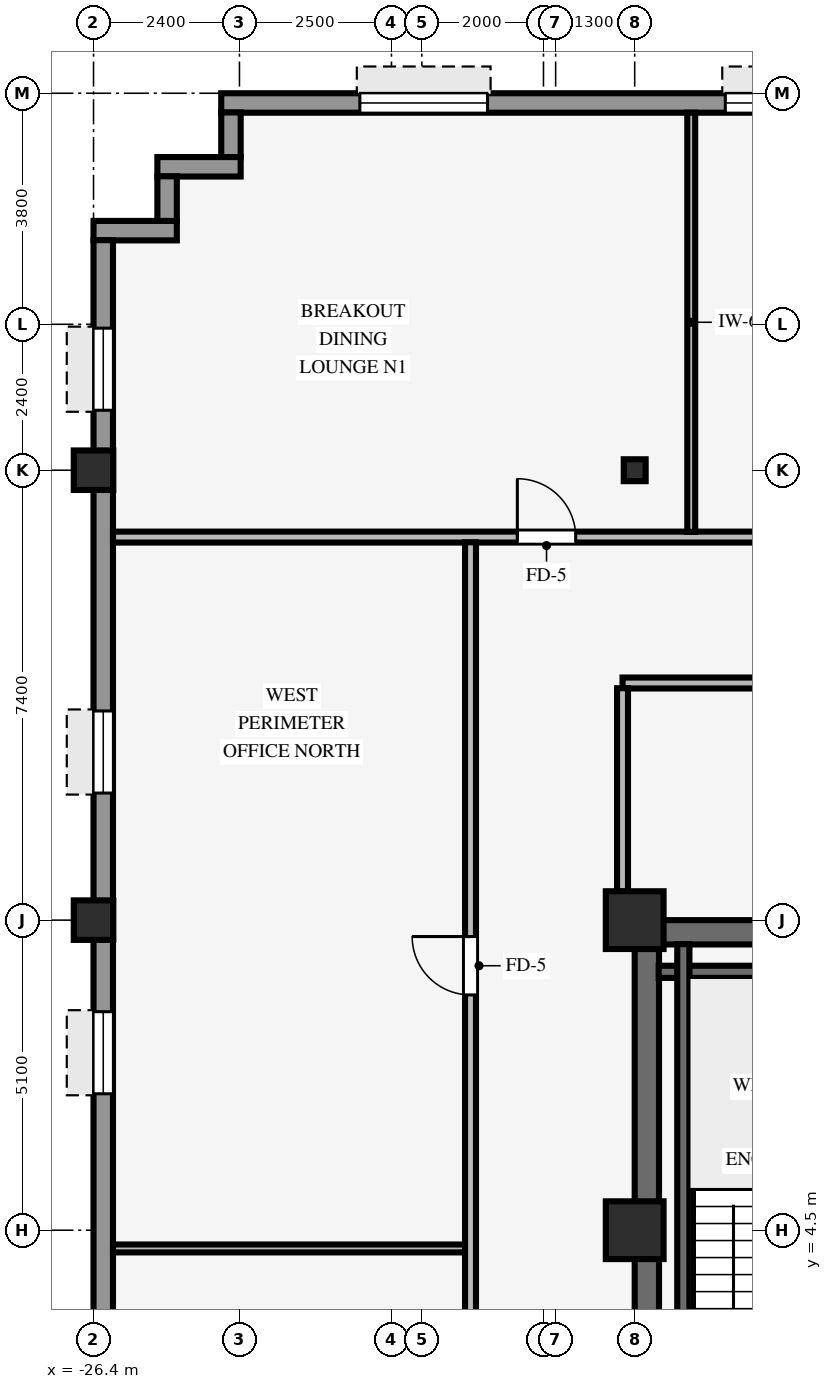
"""IFC4 building model, lengths in metres.
Left out: names, types, materials, properties, quantities, classifications, styles, units other than length and angle.
Written with IfcOpenShell. Run it as: python <this file> out.ifc"""

import sys

from ifc_helpers import new_model, si_unit, direction, frame, frame_2d, origin, origin_2d, place, context, subcontext, project, spatial, rectangle, hollow_rectangle, i_section, extrude, source, transform, mapped, element, fill, save


model = new_model("IFC4")
c1 = context("Model", 3, precision=1e-05, world=origin(), true_north=direction((0.0, 1.0)))
c2 = subcontext(c1, "Body", "Model", "MODEL_VIEW")
j1 = project(units=[si_unit("LENGTHUNIT", "METRE"), si_unit("PLANEANGLEUNIT", "RADIAN")], contexts=[c1])
p1 = place(None, origin())
s1 = spatial("IfcSite", under=j1, at=p1, CompositionType="ELEMENT")
p2 = place(p1, origin())
s2 = spatial("IfcBuilding", under=s1, at=p2, CompositionType="ELEMENT")
p3 = place(p2, frame((0.0, 0.0, 138.45)))
s3 = spatial("IfcBuildingStorey", under=s2, at=p3, CompositionType="ELEMENT", Elevation=138.45)
p4 = place(p3, frame((-17.5, 9.4, 0.0), z_axis=(0.0, 0.0, 1.0), x_axis=(1.0, 0.0, 0.0)))
e1 = element("IfcWall", 1, at=p4, inside=s3, PredefinedType="SHEAR", context=c2, shape_type="SweptSolid", body=[
    extrude(rectangle(XDim=8.5, YDim=0.4, at=frame_2d((4.25, 0.0))), origin(), (0.0, 0.0, 1.0), 3.37),
])
p5 = place(p3, frame((-17.3, -9.205, 0.0), z_axis=(0.0, 0.0, 1.0), x_axis=(0.0, 1.0, 0.0)))
e2 = element("IfcWall", 2, at=p5, inside=s3, PredefinedType="SHEAR", context=c2, shape_type="SweptSolid", body=[
    extrude(rectangle(XDim=18.41, YDim=0.4, at=frame_2d((9.205, 0.0))), origin(), (0.0, 0.0, 1.0), 3.37),
])
for number, where, z_axis, x_axis in (
    (3, (-17.5, 4.5, 0.0), (0.0, 0.0, 1.0), (1.0, 0.0, 0.0)),
    (4, (-17.5, 9.6, 0.0), (0.0, 0.0, 1.0), (1.0, 0.0, 0.0)),
):
    element("IfcColumn", number, at=place(p3, frame(where, z_axis=z_axis, x_axis=x_axis)), inside=s3, PredefinedType="COLUMN", context=c2, shape_type="SweptSolid", body=[
        extrude(rectangle(XDim=0.95, YDim=0.95, at=origin_2d()), origin(), (0.0, 0.0, 1.0), 3.37),
    ])
for number, where, z_axis, x_axis in (
    (5, (-26.4, 9.6, 0.0), (0.0, 0.0, 1.0), (1.0, 0.0, 0.0)),
    (6, (-26.4, 17.0, 0.0), (0.0, 0.0, 1.0), (1.0, 0.0, 0.0)),
):
    element("IfcColumn", number, at=place(p3, frame(where, z_axis=z_axis, x_axis=x_axis)), inside=s3, PredefinedType="COLUMN", context=c2, shape_type="SweptSolid", body=[
        extrude(hollow_rectangle(XDim=0.65, YDim=0.65, WallThickness=0.04, InnerFilletRadius=0.04, OuterFilletRadius=0.08, at=origin_2d()), origin(), (0.0, 0.0, 1.0), 3.37),
    ])
p6 = place(p3, frame((-17.5, 17.0, 0.0), z_axis=(0.0, 0.0, 1.0), x_axis=(1.0, 0.0, 0.0)))
e7 = element("IfcColumn", 7, at=p6, inside=s3, PredefinedType="COLUMN", context=c2, shape_type="SweptSolid", body=[
    extrude(i_section(OverallWidth=0.36, OverallDepth=0.36, WebThickness=0.021, FlangeThickness=0.021, FilletRadius=0.018, at=origin_2d()), origin(), (0.0, 0.0, 1.0), 3.37),
])
p7 = place(p3, frame((-24.3, 23.04, 0.0), z_axis=(0.0, 0.0, 1.0), x_axis=(1.0, 0.0, 0.0)))
e8 = element("IfcWall", 8, at=p7, inside=s3, PredefinedType="STANDARD", context=c2, shape_type="SweptSolid", body=[
    extrude(rectangle(XDim=48.6, YDim=0.32, at=frame_2d((24.3, 0.0))), origin(), (0.0, 0.0, 1.0), 2.705),
])
p8 = place(p7, frame((28.5, 0.0, 0.0)))
e9 = element("IfcOpeningElement", 9, at=p8, cuts=e8, PredefinedType="OPENING", context=c2, shape_type="SweptSolid", body=[
    extrude(rectangle(XDim=1.05, YDim=2.1, at=frame_2d((0.525, 1.05))), frame((0.0, 0.17, 0.0), z_axis=(0.0, -1.0, 0.0), x_axis=(1.0, 0.0, 0.0)), (0.0, 0.0, 1.0), 0.34),
])
p9 = place(p7, frame((2.28, 0.0, 0.8)))
e10 = element("IfcOpeningElement", 10, at=p9, cuts=e8, PredefinedType="OPENING", context=c2, shape_type="SweptSolid", body=[
    extrude(rectangle(XDim=2.1, YDim=1.56, at=frame_2d((1.05, 0.78))), frame((0.0, 0.17, 0.0), z_axis=(0.0, -1.0, 0.0), x_axis=(1.0, 0.0, 0.0)), (0.0, 0.0, 1.0), 0.34),
])
p10 = place(p7, frame((8.29, 0.0, 0.8)))
e11 = element("IfcOpeningElement", 11, at=p10, cuts=e8, PredefinedType="OPENING", context=c2, shape_type="SweptSolid", body=[
    extrude(rectangle(XDim=2.1, YDim=1.56, at=frame_2d((1.05, 0.78))), frame((0.0, 0.17, 0.0), z_axis=(0.0, -1.0, 0.0), x_axis=(1.0, 0.0, 0.0)), (0.0, 0.0, 1.0), 0.34),
])
p11 = place(p7, frame((11.6, 0.0, 0.8)))
e12 = element("IfcOpeningElement", 12, at=p11, cuts=e8, PredefinedType="OPENING", context=c2, shape_type="SweptSolid", body=[
    extrude(rectangle(XDim=2.1, YDim=1.56, at=frame_2d((1.05, 0.78))), frame((0.0, 0.17, 0.0), z_axis=(0.0, -1.0, 0.0), x_axis=(1.0, 0.0, 0.0)), (0.0, 0.0, 1.0), 0.34),
])
p12 = place(p7, frame((16.26, 0.0, 0.8)))
e13 = element("IfcOpeningElement", 13, at=p12, cuts=e8, PredefinedType="OPENING", context=c2, shape_type="SweptSolid", body=[
    extrude(rectangle(XDim=2.1, YDim=1.56, at=frame_2d((1.05, 0.78))), frame((0.0, 0.17, 0.0), z_axis=(0.0, -1.0, 0.0), x_axis=(1.0, 0.0, 0.0)), (0.0, 0.0, 1.0), 0.34),
])
p13 = place(p7, frame((25.58, 0.0, 0.8)))
e14 = element("IfcOpeningElement", 14, at=p13, cuts=e8, PredefinedType="OPENING", context=c2, shape_type="SweptSolid", body=[
    extrude(rectangle(XDim=2.1, YDim=1.56, at=frame_2d((1.05, 0.78))), frame((0.0, 0.17, 0.0), z_axis=(0.0, -1.0, 0.0), x_axis=(1.0, 0.0, 0.0)), (0.0, 0.0, 1.0), 0.34),
])
p14 = place(p7, frame((30.24, 0.0, 0.8)))
e15 = element("IfcOpeningElement", 15, at=p14, cuts=e8, PredefinedType="OPENING", context=c2, shape_type="SweptSolid", body=[
    extrude(rectangle(XDim=2.1, YDim=1.56, at=frame_2d((1.05, 0.78))), frame((0.0, 0.17, 0.0), z_axis=(0.0, -1.0, 0.0), x_axis=(1.0, 0.0, 0.0)), (0.0, 0.0, 1.0), 0.34),
])
p15 = place(p7, frame((34.9, 0.0, 0.8)))
e16 = element("IfcOpeningElement", 16, at=p15, cuts=e8, PredefinedType="OPENING", context=c2, shape_type="SweptSolid", body=[
    extrude(rectangle(XDim=2.1, YDim=1.56, at=frame_2d((1.05, 0.78))), frame((0.0, 0.17, 0.0), z_axis=(0.0, -1.0, 0.0), x_axis=(1.0, 0.0, 0.0)), (0.0, 0.0, 1.0), 0.34),
])
p16 = place(p7, frame((39.56, 0.0, 0.8)))
e17 = element("IfcOpeningElement", 17, at=p16, cuts=e8, PredefinedType="OPENING", context=c2, shape_type="SweptSolid", body=[
    extrude(rectangle(XDim=2.1, YDim=1.56, at=frame_2d((1.05, 0.78))), frame((0.0, 0.17, 0.0), z_axis=(0.0, -1.0, 0.0), x_axis=(1.0, 0.0, 0.0)), (0.0, 0.0, 1.0), 0.34),
])
p17 = place(p7, frame((44.22, 0.0, 0.8)))
e18 = element("IfcOpeningElement", 18, at=p17, cuts=e8, PredefinedType="OPENING", context=c2, shape_type="SweptSolid", body=[
    extrude(rectangle(XDim=2.1, YDim=1.56, at=frame_2d((1.05, 0.78))), frame((0.0, 0.17, 0.0), z_axis=(0.0, -1.0, 0.0), x_axis=(1.0, 0.0, 0.0)), (0.0, 0.0, 1.0), 0.34),
])
p18 = place(p3, frame((-24.14, 22.146, 0.0), z_axis=(0.0, 0.0, 1.0), x_axis=(0.0, 1.0, 0.0)))
e19 = element("IfcWall", 19, at=p18, inside=s3, PredefinedType="STANDARD", context=c2, shape_type="SweptSolid", body=[
    extrude(rectangle(XDim=0.738, YDim=0.32, at=frame_2d((0.369, 0.0))), origin(), (0.0, 0.0, 1.0), 3.36),
])
p19 = place(p3, frame((-25.35, 21.99, 0.0), z_axis=(0.0, 0.0, 1.0), x_axis=(1.0, 0.0, 0.0)))
e20 = element("IfcWall", 20, at=p19, inside=s3, PredefinedType="STANDARD", context=c2, shape_type="SweptSolid", body=[
    extrude(rectangle(XDim=1.37, YDim=0.32, at=frame_2d((0.685, 0.0))), origin(), (0.0, 0.0, 1.0), 3.36),
])
p20 = place(p3, frame((-25.19, 21.096, 0.0), z_axis=(0.0, 0.0, 1.0), x_axis=(0.0, 1.0, 0.0)))
e21 = element("IfcWall", 21, at=p20, inside=s3, PredefinedType="STANDARD", context=c2, shape_type="SweptSolid", body=[
    extrude(rectangle(XDim=0.738, YDim=0.32, at=frame_2d((0.369, 0.0))), origin(), (0.0, 0.0, 1.0), 3.36),
])
p21 = place(p3, frame((-26.4, 20.94, 0.0), z_axis=(0.0, 0.0, 1.0), x_axis=(1.0, 0.0, 0.0)))
e22 = element("IfcWall", 22, at=p21, inside=s3, PredefinedType="STANDARD", context=c2, shape_type="SweptSolid", body=[
    extrude(rectangle(XDim=1.37, YDim=0.32, at=frame_2d((0.685, 0.0))), origin(), (0.0, 0.0, 1.0), 3.36),
])
p22 = place(p3, frame((-26.24, -20.784, 0.0), z_axis=(0.0, 0.0, 1.0), x_axis=(0.0, 1.0, 0.0)))
e23 = element("IfcWall", 23, at=p22, inside=s3, PredefinedType="STANDARD", context=c2, shape_type="SweptSolid", body=[
    extrude(rectangle(XDim=41.568, YDim=0.32, at=frame_2d((20.784, 0.0))), origin(), (0.0, 0.0, 1.0), 2.705),
])
p23 = place(p22, frame((1.448, 0.0, 0.8)))
e24 = element("IfcOpeningElement", 24, at=p23, cuts=e23, PredefinedType="OPENING", context=c2, shape_type="SweptSolid", body=[
    extrude(rectangle(XDim=1.35, YDim=1.56, at=frame_2d((0.675, 0.78))), frame((0.0, 0.17, 0.0), z_axis=(0.0, -1.0, 0.0), x_axis=(1.0, 0.0, 0.0)), (0.0, 0.0, 1.0), 0.34),
])
p24 = place(p22, frame((7.744, 0.0, 0.8)))
e25 = element("IfcOpeningElement", 25, at=p24, cuts=e23, PredefinedType="OPENING", context=c2, shape_type="SweptSolid", body=[
    extrude(rectangle(XDim=1.35, YDim=1.56, at=frame_2d((0.675, 0.78))), frame((0.0, 0.17, 0.0), z_axis=(0.0, -1.0, 0.0), x_axis=(1.0, 0.0, 0.0)), (0.0, 0.0, 1.0), 0.34),
])
p25 = place(p22, frame((12.69, 0.0, 0.8)))
e26 = element("IfcOpeningElement", 26, at=p25, cuts=e23, PredefinedType="OPENING", context=c2, shape_type="SweptSolid", body=[
    extrude(rectangle(XDim=1.35, YDim=1.56, at=frame_2d((0.675, 0.78))), frame((0.0, 0.17, 0.0), z_axis=(0.0, -1.0, 0.0), x_axis=(1.0, 0.0, 0.0)), (0.0, 0.0, 1.0), 0.34),
])
p26 = place(p22, frame((17.636, 0.0, 0.8)))
e27 = element("IfcOpeningElement", 27, at=p26, cuts=e23, PredefinedType="OPENING", context=c2, shape_type="SweptSolid", body=[
    extrude(rectangle(XDim=1.35, YDim=1.56, at=frame_2d((0.675, 0.78))), frame((0.0, 0.17, 0.0), z_axis=(0.0, -1.0, 0.0), x_axis=(1.0, 0.0, 0.0)), (0.0, 0.0, 1.0), 0.34),
])
p27 = place(p22, frame((22.582, 0.0, 0.8)))
e28 = element("IfcOpeningElement", 28, at=p27, cuts=e23, PredefinedType="OPENING", context=c2, shape_type="SweptSolid", body=[
    extrude(rectangle(XDim=1.35, YDim=1.56, at=frame_2d((0.675, 0.78))), frame((0.0, 0.17, 0.0), z_axis=(0.0, -1.0, 0.0), x_axis=(1.0, 0.0, 0.0)), (0.0, 0.0, 1.0), 0.34),
])
p28 = place(p22, frame((27.528, 0.0, 0.8)))
e29 = element("IfcOpeningElement", 29, at=p28, cuts=e23, PredefinedType="OPENING", context=c2, shape_type="SweptSolid", body=[
    extrude(rectangle(XDim=1.35, YDim=1.56, at=frame_2d((0.675, 0.78))), frame((0.0, 0.17, 0.0), z_axis=(0.0, -1.0, 0.0), x_axis=(1.0, 0.0, 0.0)), (0.0, 0.0, 1.0), 0.34),
])
p29 = place(p22, frame((32.474, 0.0, 0.8)))
e30 = element("IfcOpeningElement", 30, at=p29, cuts=e23, PredefinedType="OPENING", context=c2, shape_type="SweptSolid", body=[
    extrude(rectangle(XDim=1.35, YDim=1.56, at=frame_2d((0.675, 0.78))), frame((0.0, 0.17, 0.0), z_axis=(0.0, -1.0, 0.0), x_axis=(1.0, 0.0, 0.0)), (0.0, 0.0, 1.0), 0.34),
])
p30 = place(p22, frame((38.77, 0.0, 0.8)))
e31 = element("IfcOpeningElement", 31, at=p30, cuts=e23, PredefinedType="OPENING", context=c2, shape_type="SweptSolid", body=[
    extrude(rectangle(XDim=1.35, YDim=1.56, at=frame_2d((0.675, 0.78))), frame((0.0, 0.17, 0.0), z_axis=(0.0, -1.0, 0.0), x_axis=(1.0, 0.0, 0.0)), (0.0, 0.0, 1.0), 0.34),
])
p31 = place(p3, frame((-17.105, 8.75, 0.0), z_axis=(0.0, 0.0, 1.0), x_axis=(1.0, 0.0, 0.0)))
e32 = element("IfcWall", 32, at=p31, inside=s3, PredefinedType="SHEAR", context=c2, shape_type="SweptSolid", body=[
    extrude(rectangle(XDim=3.57, YDim=0.2, at=frame_2d((1.785, 0.0))), origin(), (0.0, 0.0, 1.0), 3.37),
])
p32 = place(p3, frame((-16.7, 1.095, 0.0), z_axis=(0.0, 0.0, 1.0), x_axis=(0.0, 1.0, 0.0)))
e33 = element("IfcWall", 33, at=p32, inside=s3, PredefinedType="SHEAR", context=c2, shape_type="SweptSolid", body=[
    extrude(rectangle(XDim=8.11, YDim=0.2, at=frame_2d((4.055, 0.0))), origin(), (0.0, 0.0, 1.0), 3.37),
])
p33 = place(p3, frame((-26.08, 4.2, 0.0), z_axis=(0.0, 0.0, 1.0), x_axis=(1.0, 0.0, 0.0)))
e34 = element("IfcWall", 34, at=p33, inside=s3, PredefinedType="PARTITIONING", context=c2, shape_type="SweptSolid", body=[
    extrude(rectangle(XDim=5.794, YDim=0.13, at=frame_2d((2.897, 0.0))), origin(), (0.0, 0.0, 1.0), 3.36),
])
p34 = place(p3, frame((-17.7, 13.5, 0.0), z_axis=(0.0, 0.0, 1.0), x_axis=(1.0, 0.0, 0.0)))
e35 = element("IfcWall", 35, at=p34, inside=s3, PredefinedType="PARTITIONING", context=c2, shape_type="SweptSolid", body=[
    extrude(rectangle(XDim=24.3, YDim=0.18, at=frame_2d((12.15, 0.0))), origin(), (0.0, 0.0, 1.0), 2.998),
])
p35 = place(p34, frame((4.57, 0.0, 0.0)))
e36 = element("IfcOpeningElement", 36, at=p35, cuts=e35, PredefinedType="OPENING", context=c2, shape_type="SweptSolid", body=[
    extrude(rectangle(XDim=0.96, YDim=2.1, at=frame_2d((0.48, 1.05))), frame((0.0, 0.1, 0.0), z_axis=(0.0, -1.0, 0.0), x_axis=(1.0, 0.0, 0.0)), (0.0, 0.0, 1.0), 0.2),
])
p36 = place(p34, frame((13.72, 0.0, 0.0)))
e37 = element("IfcOpeningElement", 37, at=p36, cuts=e35, PredefinedType="OPENING", context=c2, shape_type="SweptSolid", body=[
    extrude(rectangle(XDim=0.96, YDim=2.1, at=frame_2d((0.48, 1.05))), frame((0.0, 0.1, 0.0), z_axis=(0.0, -1.0, 0.0), x_axis=(1.0, 0.0, 0.0)), (0.0, 0.0, 1.0), 0.2),
])
p37 = place(p34, frame((18.9, 0.0, 0.0)))
e38 = element("IfcOpeningElement", 38, at=p37, cuts=e35, PredefinedType="OPENING", context=c2, shape_type="SweptSolid", body=[
    extrude(rectangle(XDim=0.9, YDim=2.1, at=frame_2d((0.45, 1.05))), frame((0.0, 0.1, 0.0), z_axis=(0.0, -1.0, 0.0), x_axis=(1.0, 0.0, 0.0)), (0.0, 0.0, 1.0), 0.2),
])
p38 = place(p34, frame((21.0, 0.0, 0.0)))
e39 = element("IfcOpeningElement", 39, at=p38, cuts=e35, PredefinedType="OPENING", context=c2, shape_type="SweptSolid", body=[
    extrude(rectangle(XDim=0.9, YDim=2.1, at=frame_2d((0.45, 1.05))), frame((0.0, 0.1, 0.0), z_axis=(0.0, -1.0, 0.0), x_axis=(1.0, 0.0, 0.0)), (0.0, 0.0, 1.0), 0.2),
])
p39 = place(p3, frame((-26.08, 15.9, 0.0), z_axis=(0.0, 0.0, 1.0), x_axis=(1.0, 0.0, 0.0)))
e40 = element("IfcWall", 40, at=p39, inside=s3, PredefinedType="PARTITIONING", context=c2, shape_type="SweptSolid", body=[
    extrude(rectangle(XDim=52.16, YDim=0.18, at=frame_2d((26.08, 0.0))), origin(), (0.0, 0.0, 1.0), 3.36),
])
p40 = place(p39, frame((15.55, 0.0, 0.0)))
e41 = element("IfcOpeningElement", 41, at=p40, cuts=e40, PredefinedType="OPENING", context=c2, shape_type="SweptSolid", body=[
    extrude(rectangle(XDim=0.96, YDim=2.1, at=frame_2d((0.48, 1.05))), frame((0.0, 0.1, 0.0), z_axis=(0.0, -1.0, 0.0), x_axis=(1.0, 0.0, 0.0)), (0.0, 0.0, 1.0), 0.2),
])
p41 = place(p39, frame((40.5, 0.0, 0.0)))
e42 = element("IfcOpeningElement", 42, at=p41, cuts=e40, PredefinedType="OPENING", context=c2, shape_type="SweptSolid", body=[
    extrude(rectangle(XDim=0.96, YDim=2.1, at=frame_2d((0.48, 1.05))), frame((0.0, 0.1, 0.0), z_axis=(0.0, -1.0, 0.0), x_axis=(1.0, 0.0, 0.0)), (0.0, 0.0, 1.0), 0.2),
])
p42 = place(p39, frame((6.65, 0.0, 0.0)))
e43 = element("IfcOpeningElement", 43, at=p42, cuts=e40, PredefinedType="OPENING", context=c2, shape_type="SweptSolid", body=[
    extrude(rectangle(XDim=0.96, YDim=2.1, at=frame_2d((0.48, 1.05))), frame((0.0, 0.1, 0.0), z_axis=(0.0, -1.0, 0.0), x_axis=(1.0, 0.0, 0.0)), (0.0, 0.0, 1.0), 0.2),
])
p43 = place(p3, frame((-20.2, -15.814, 0.0), z_axis=(0.0, 0.0, 1.0), x_axis=(0.0, 1.0, 0.0)))
e44 = element("IfcWall", 44, at=p43, inside=s3, PredefinedType="PARTITIONING", context=c2, shape_type="SweptSolid", body=[
    extrude(rectangle(XDim=31.628, YDim=0.18, at=frame_2d((15.814, 0.0))), origin(), (0.0, 0.0, 1.0), 3.36),
])
p44 = place(p43, frame((10.684, 0.0, 0.0)))
e45 = element("IfcOpeningElement", 45, at=p44, cuts=e44, PredefinedType="OPENING", context=c2, shape_type="SweptSolid", body=[
    extrude(rectangle(XDim=0.96, YDim=2.1, at=frame_2d((0.48, 1.05))), frame((0.0, 0.1, 0.0), z_axis=(0.0, -1.0, 0.0), x_axis=(1.0, 0.0, 0.0)), (0.0, 0.0, 1.0), 0.2),
])
p45 = place(p43, frame((24.184, 0.0, 0.0)))
e46 = element("IfcOpeningElement", 46, at=p45, cuts=e44, PredefinedType="OPENING", context=c2, shape_type="SweptSolid", body=[
    extrude(rectangle(XDim=0.96, YDim=2.1, at=frame_2d((0.48, 1.05))), frame((0.0, 0.1, 0.0), z_axis=(0.0, -1.0, 0.0), x_axis=(1.0, 0.0, 0.0)), (0.0, 0.0, 1.0), 0.2),
])
p46 = place(p3, frame((-17.7, 10.071, 0.0), z_axis=(0.0, 0.0, 1.0), x_axis=(0.0, 1.0, 0.0)))
e47 = element("IfcWall", 47, at=p46, inside=s3, PredefinedType="PARTITIONING", context=c2, shape_type="SweptSolid", body=[
    extrude(rectangle(XDim=3.343, YDim=0.18, at=frame_2d((1.671, 0.0))), origin(), (0.0, 0.0, 1.0), 2.816),
])
p47 = place(p3, frame((-16.57, 15.986, 0.0), z_axis=(0.0, 0.0, 1.0), x_axis=(0.0, 1.0, 0.0)))
e48 = element("IfcWall", 48, at=p47, inside=s3, PredefinedType="PARTITIONING", context=c2, shape_type="SweptSolid", body=[
    extrude(rectangle(XDim=6.894, YDim=0.13, at=frame_2d((3.447, 0.0))), origin(), (0.0, 0.0, 1.0), 3.36),
])
m1 = source(origin(), c2, "Body", "SweptSolid", [
    extrude(rectangle(XDim=2.1, YDim=1.56, at=frame_2d((1.05, 0.78))), frame((0.0, 0.03, 0.0), z_axis=(0.0, -1.0, 0.0), x_axis=(1.0, 0.0, 0.0)), (0.0, 0.0, 1.0), 0.06),
])
p48 = place(p9, origin())
e49 = element("IfcWindow", 49, at=p48, inside=s3, PartitioningType="SINGLE_PANEL", PredefinedType="WINDOW", context=c2, shape_type="MappedRepresentation", body=[
    mapped(m1, transform((0.0, 0.0, 0.0), scale=1.0)),
])
fill(e10, e49)
p49 = place(p10, origin())
e50 = element("IfcWindow", 50, at=p49, inside=s3, PartitioningType="SINGLE_PANEL", PredefinedType="WINDOW", context=c2, shape_type="MappedRepresentation", body=[
    mapped(m1, transform((0.0, 0.0, 0.0), scale=1.0)),
])
fill(e11, e50)
m2 = source(origin(), c2, "Body", "SweptSolid", [
    extrude(rectangle(XDim=1.35, YDim=1.56, at=frame_2d((0.675, 0.78))), frame((0.0, 0.03, 0.0), z_axis=(0.0, -1.0, 0.0), x_axis=(1.0, 0.0, 0.0)), (0.0, 0.0, 1.0), 0.06),
])
p50 = place(p28, origin())
e51 = element("IfcWindow", 51, at=p50, inside=s3, PartitioningType="SINGLE_PANEL", PredefinedType="WINDOW", context=c2, shape_type="MappedRepresentation", body=[
    mapped(m2, transform((0.0, 0.0, 0.0), scale=1.0)),
])
fill(e29, e51)
p51 = place(p29, origin())
e52 = element("IfcWindow", 52, at=p51, inside=s3, PartitioningType="SINGLE_PANEL", PredefinedType="WINDOW", context=c2, shape_type="MappedRepresentation", body=[
    mapped(m2, transform((0.0, 0.0, 0.0), scale=1.0)),
])
fill(e30, e52)
p52 = place(p30, origin())
e53 = element("IfcWindow", 53, at=p52, inside=s3, PartitioningType="SINGLE_PANEL", PredefinedType="WINDOW", context=c2, shape_type="MappedRepresentation", body=[
    mapped(m2, transform((0.0, 0.0, 0.0), scale=1.0)),
])
fill(e31, e53)
m3 = source(origin(), c2, "Body", "SweptSolid", [
    extrude(rectangle(XDim=0.96, YDim=2.1, at=frame_2d((0.48, 1.05))), frame((0.0, 0.025, 0.0), z_axis=(0.0, -1.0, 0.0), x_axis=(1.0, 0.0, 0.0)), (0.0, 0.0, 1.0), 0.05),
])
p53 = place(p45, origin())
e54 = element("IfcDoor", 54, at=p53, inside=s3, OperationType="SINGLE_SWING_RIGHT", PredefinedType="DOOR", context=c2, shape_type="MappedRepresentation", body=[
    mapped(m3, transform((0.0, 0.0, 0.0), scale=1.0)),
])
fill(e46, e54)
p54 = place(p42, origin())
e55 = element("IfcDoor", 55, at=p54, inside=s3, OperationType="SINGLE_SWING_LEFT", PredefinedType="DOOR", context=c2, shape_type="MappedRepresentation", body=[
    mapped(m3, transform((0.0, 0.0, 0.0), scale=1.0)),
])
fill(e43, e55)
save(model, sys.argv[1])
